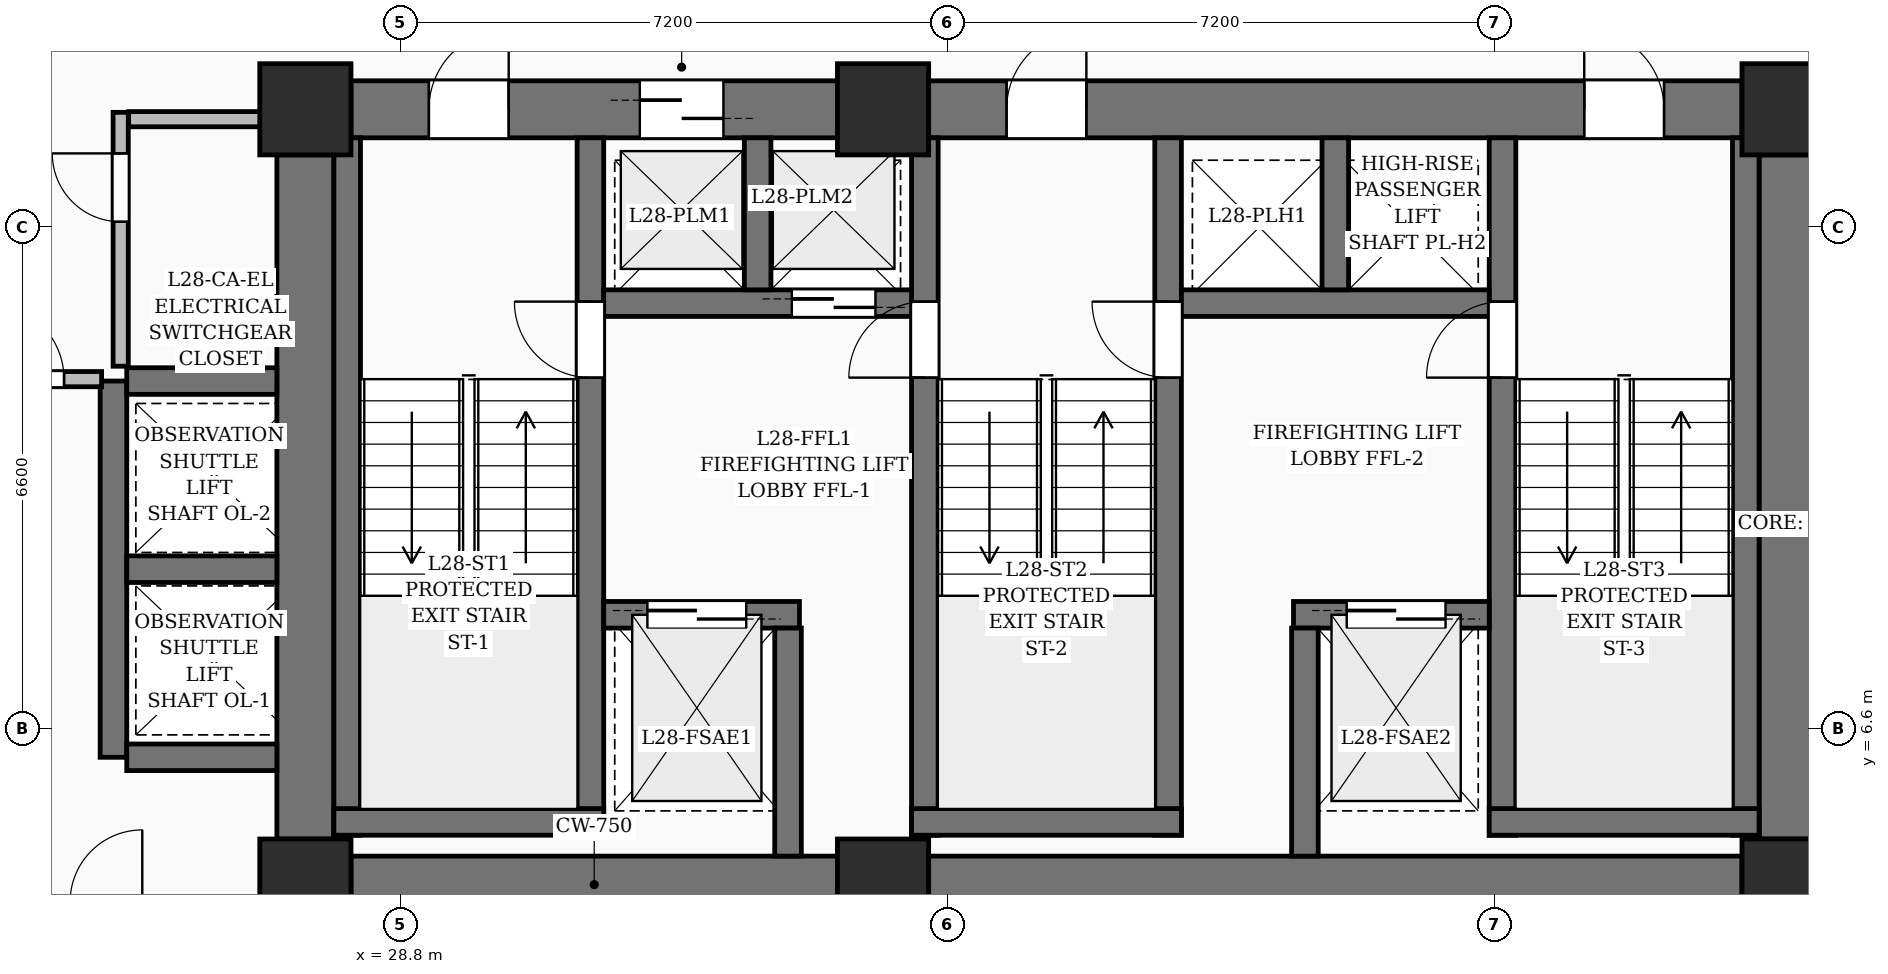
"""IFC4 building model, lengths in metres.
Left out: names, types, materials, properties, quantities, classifications, styles, units other than length and angle.
Written with IfcOpenShell. Run it as: python <this file> out.ifc"""

import sys

from ifc_helpers import new_model, si_unit, direction, frame, frame_2d, origin, origin_2d, place, context, subcontext, project, spatial, rectangle, extrude, element, fill, save


model = new_model("IFC4")
c1 = context("Model", 3, precision=1e-05, world=origin(), true_north=direction((0.0, 1.0)))
c2 = subcontext(c1, "Body", "Model", "MODEL_VIEW")
j1 = project(units=[si_unit("LENGTHUNIT", "METRE"), si_unit("PLANEANGLEUNIT", "RADIAN")], contexts=[c1])
p1 = place(None, origin())
s1 = spatial("IfcSite", under=j1, at=p1, CompositionType="ELEMENT")
p2 = place(p1, origin())
s2 = spatial("IfcBuilding", under=s1, at=p2, CompositionType="ELEMENT")
p3 = place(p2, frame((0.0, 0.0, 114.0)))
s3 = spatial("IfcBuildingStorey", under=s2, at=p3, CompositionType="ELEMENT", Elevation=114.0)
for number, where, z_axis, x_axis in (
    (1, (27.55, 4.55, 0.0), (0.0, 0.0, 1.0), (1.0, 0.0, 0.0)),
    (2, (35.15, 4.55, 0.0), (0.0, 0.0, 1.0), (1.0, 0.0, 0.0)),
    (3, (47.05, 4.55, 0.0), (0.0, 0.0, 1.0), (1.0, 0.0, 0.0)),
    (4, (27.55, 14.75, 0.0), (0.0, 0.0, 1.0), (1.0, 0.0, 0.0)),
    (5, (35.15, 14.75, 0.0), (0.0, 0.0, 1.0), (1.0, 0.0, 0.0)),
    (6, (47.05, 14.75, 0.0), (0.0, 0.0, 1.0), (1.0, 0.0, 0.0)),
):
    element("IfcColumn", number, at=place(p3, frame(where, z_axis=z_axis, x_axis=x_axis)), inside=s3, PredefinedType="COLUMN", context=c2, shape_type="SweptSolid", body=[
        extrude(rectangle(XDim=1.2, YDim=1.2, at=origin_2d()), origin(), (0.0, 0.0, 1.0), 3.6),
    ])
p4 = place(p3, frame((28.15, 4.55, 0.0), z_axis=(0.0, 0.0, 1.0), x_axis=(1.0, 0.0, 0.0)))
e7 = element("IfcWall", 7, at=p4, inside=s3, PredefinedType="SHEAR", context=c2, shape_type="SweptSolid", body=[
    extrude(rectangle(XDim=6.4, YDim=0.75, at=frame_2d((3.2, 0.0))), origin(), (0.0, 0.0, 1.0), 3.6),
])
p5 = place(p3, frame((35.75, 4.55, 0.0), z_axis=(0.0, 0.0, 1.0), x_axis=(1.0, 0.0, 0.0)))
e8 = element("IfcWall", 8, at=p5, inside=s3, PredefinedType="SHEAR", context=c2, shape_type="SweptSolid", body=[
    extrude(rectangle(XDim=10.7, YDim=0.75, at=frame_2d((5.35, 0.0))), origin(), (0.0, 0.0, 1.0), 3.6),
])
p6 = place(p3, frame((28.15, 14.75, 0.0), z_axis=(0.0, 0.0, 1.0), x_axis=(1.0, 0.0, 0.0)))
e9 = element("IfcWall", 9, at=p6, inside=s3, PredefinedType="SHEAR", context=c2, shape_type="SweptSolid", body=[
    extrude(rectangle(XDim=6.4, YDim=0.75, at=frame_2d((3.2, 0.0))), origin(), (0.0, 0.0, 1.0), 3.6),
])
p7 = place(p6, frame((1.025, 0.0, 0.0)))
e10 = element("IfcOpeningElement", 10, at=p7, cuts=e9, PredefinedType="OPENING", context=c2, shape_type="SweptSolid", body=[
    extrude(rectangle(XDim=1.05, YDim=2.15, at=frame_2d((0.525, 1.075))), frame((0.0, 0.385, 0.0), z_axis=(0.0, -1.0, 0.0), x_axis=(1.0, 0.0, 0.0)), (0.0, 0.0, 1.0), 0.77),
])
p8 = place(p6, frame((3.8, 0.0, 0.0)))
e11 = element("IfcOpeningElement", 11, at=p8, cuts=e9, PredefinedType="OPENING", context=c2, shape_type="SweptSolid", body=[
    extrude(rectangle(XDim=1.1, YDim=2.2, at=frame_2d((0.55, 1.1))), frame((0.0, 0.385, 0.0), z_axis=(0.0, -1.0, 0.0), x_axis=(1.0, 0.0, 0.0)), (0.0, 0.0, 1.0), 0.77),
])
p9 = place(p3, frame((35.75, 14.75, 0.0), z_axis=(0.0, 0.0, 1.0), x_axis=(1.0, 0.0, 0.0)))
e12 = element("IfcWall", 12, at=p9, inside=s3, PredefinedType="SHEAR", context=c2, shape_type="SweptSolid", body=[
    extrude(rectangle(XDim=10.7, YDim=0.75, at=frame_2d((5.35, 0.0))), origin(), (0.0, 0.0, 1.0), 3.6),
])
p10 = place(p9, frame((1.025, 0.0, 0.0)))
e13 = element("IfcOpeningElement", 13, at=p10, cuts=e12, PredefinedType="OPENING", context=c2, shape_type="SweptSolid", body=[
    extrude(rectangle(XDim=1.05, YDim=2.15, at=frame_2d((0.525, 1.075))), frame((0.0, 0.385, 0.0), z_axis=(0.0, -1.0, 0.0), x_axis=(1.0, 0.0, 0.0)), (0.0, 0.0, 1.0), 0.77),
])
p11 = place(p9, frame((8.625, 0.0, 0.0)))
e14 = element("IfcOpeningElement", 14, at=p11, cuts=e12, PredefinedType="OPENING", context=c2, shape_type="SweptSolid", body=[
    extrude(rectangle(XDim=1.05, YDim=2.15, at=frame_2d((0.525, 1.075))), frame((0.0, 0.385, 0.0), z_axis=(0.0, -1.0, 0.0), x_axis=(1.0, 0.0, 0.0)), (0.0, 0.0, 1.0), 0.77),
])
for number, where, z_axis, x_axis in (
    (15, (27.55, 5.15, 0.0), (0.0, 0.0, 1.0), (0.0, 1.0, 0.0)),
    (16, (47.05, 5.15, 0.0), (0.0, 0.0, 1.0), (0.0, 1.0, 0.0)),
):
    element("IfcWall", number, at=place(p3, frame(where, z_axis=z_axis, x_axis=x_axis)), inside=s3, PredefinedType="SHEAR", context=c2, shape_type="SweptSolid", body=[
        extrude(rectangle(XDim=9.0, YDim=0.75, at=frame_2d((4.5, 0.0))), origin(), (0.0, 0.0, 1.0), 3.6),
    ])
p12 = place(p3, frame((28.1, 5.2, 0.0), z_axis=(0.0, 0.0, 1.0), x_axis=(0.0, 1.0, 0.0)))
e17 = element("IfcWall", 17, at=p12, inside=s3, PredefinedType="SOLIDWALL", context=c2, shape_type="SweptSolid", body=[
    extrude(rectangle(XDim=9.175, YDim=0.35, at=frame_2d((4.587, 0.0))), origin(), (0.0, 0.0, 1.0), 3.6),
])
p13 = place(p3, frame((31.3, 5.2, 0.0), z_axis=(0.0, 0.0, 1.0), x_axis=(0.0, 1.0, 0.0)))
e18 = element("IfcWall", 18, at=p13, inside=s3, PredefinedType="SOLIDWALL", context=c2, shape_type="SweptSolid", body=[
    extrude(rectangle(XDim=9.175, YDim=0.35, at=frame_2d((4.587, 0.0))), origin(), (0.0, 0.0, 1.0), 3.6),
])
p14 = place(p13, frame((6.02, 0.0, 0.0)))
e19 = element("IfcOpeningElement", 19, at=p14, cuts=e18, PredefinedType="OPENING", context=c2, shape_type="SweptSolid", body=[
    extrude(rectangle(XDim=1.0, YDim=2.15, at=frame_2d((0.5, 1.075))), frame((0.0, 0.185, 0.0), z_axis=(0.0, -1.0, 0.0), x_axis=(1.0, 0.0, 0.0)), (0.0, 0.0, 1.0), 0.37),
])
p15 = place(p3, frame((27.925, 5.375, 0.0), z_axis=(0.0, 0.0, 1.0), x_axis=(1.0, 0.0, 0.0)))
e20 = element("IfcWall", 20, at=p15, inside=s3, PredefinedType="SOLIDWALL", context=c2, shape_type="SweptSolid", body=[
    extrude(rectangle(XDim=3.55, YDim=0.35, at=frame_2d((1.775, 0.0))), origin(), (0.0, 0.0, 1.0), 3.6),
])
p16 = place(p3, frame((35.7, 5.2, 0.0), z_axis=(0.0, 0.0, 1.0), x_axis=(0.0, 1.0, 0.0)))
e21 = element("IfcWall", 21, at=p16, inside=s3, PredefinedType="SOLIDWALL", context=c2, shape_type="SweptSolid", body=[
    extrude(rectangle(XDim=9.175, YDim=0.35, at=frame_2d((4.587, 0.0))), origin(), (0.0, 0.0, 1.0), 3.6),
])
p17 = place(p16, frame((6.02, 0.0, 0.0)))
e22 = element("IfcOpeningElement", 22, at=p17, cuts=e21, PredefinedType="OPENING", context=c2, shape_type="SweptSolid", body=[
    extrude(rectangle(XDim=1.0, YDim=2.15, at=frame_2d((0.5, 1.075))), frame((0.0, 0.185, 0.0), z_axis=(0.0, -1.0, 0.0), x_axis=(1.0, 0.0, 0.0)), (0.0, 0.0, 1.0), 0.37),
])
p18 = place(p3, frame((38.9, 5.2, 0.0), z_axis=(0.0, 0.0, 1.0), x_axis=(0.0, 1.0, 0.0)))
e23 = element("IfcWall", 23, at=p18, inside=s3, PredefinedType="SOLIDWALL", context=c2, shape_type="SweptSolid", body=[
    extrude(rectangle(XDim=9.175, YDim=0.35, at=frame_2d((4.587, 0.0))), origin(), (0.0, 0.0, 1.0), 3.6),
])
p19 = place(p18, frame((6.02, 0.0, 0.0)))
e24 = element("IfcOpeningElement", 24, at=p19, cuts=e23, PredefinedType="OPENING", context=c2, shape_type="SweptSolid", body=[
    extrude(rectangle(XDim=1.0, YDim=2.15, at=frame_2d((0.5, 1.075))), frame((0.0, 0.185, 0.0), z_axis=(0.0, -1.0, 0.0), x_axis=(1.0, 0.0, 0.0)), (0.0, 0.0, 1.0), 0.37),
])
p20 = place(p3, frame((35.525, 5.375, 0.0), z_axis=(0.0, 0.0, 1.0), x_axis=(1.0, 0.0, 0.0)))
e25 = element("IfcWall", 25, at=p20, inside=s3, PredefinedType="SOLIDWALL", context=c2, shape_type="SweptSolid", body=[
    extrude(rectangle(XDim=3.55, YDim=0.35, at=frame_2d((1.775, 0.0))), origin(), (0.0, 0.0, 1.0), 3.6),
])
p21 = place(p3, frame((43.3, 5.2, 0.0), z_axis=(0.0, 0.0, 1.0), x_axis=(0.0, 1.0, 0.0)))
e26 = element("IfcWall", 26, at=p21, inside=s3, PredefinedType="SOLIDWALL", context=c2, shape_type="SweptSolid", body=[
    extrude(rectangle(XDim=9.175, YDim=0.35, at=frame_2d((4.587, 0.0))), origin(), (0.0, 0.0, 1.0), 3.6),
])
p22 = place(p21, frame((6.02, 0.0, 0.0)))
e27 = element("IfcOpeningElement", 27, at=p22, cuts=e26, PredefinedType="OPENING", context=c2, shape_type="SweptSolid", body=[
    extrude(rectangle(XDim=1.0, YDim=2.15, at=frame_2d((0.5, 1.075))), frame((0.0, 0.185, 0.0), z_axis=(0.0, -1.0, 0.0), x_axis=(1.0, 0.0, 0.0)), (0.0, 0.0, 1.0), 0.37),
])
p23 = place(p3, frame((46.5, 5.2, 0.0), z_axis=(0.0, 0.0, 1.0), x_axis=(0.0, 1.0, 0.0)))
e28 = element("IfcWall", 28, at=p23, inside=s3, PredefinedType="SOLIDWALL", context=c2, shape_type="SweptSolid", body=[
    extrude(rectangle(XDim=9.175, YDim=0.35, at=frame_2d((4.587, 0.0))), origin(), (0.0, 0.0, 1.0), 3.6),
])
p24 = place(p3, frame((43.125, 5.375, 0.0), z_axis=(0.0, 0.0, 1.0), x_axis=(1.0, 0.0, 0.0)))
e29 = element("IfcWall", 29, at=p24, inside=s3, PredefinedType="SOLIDWALL", context=c2, shape_type="SweptSolid", body=[
    extrude(rectangle(XDim=3.55, YDim=0.35, at=frame_2d((1.775, 0.0))), origin(), (0.0, 0.0, 1.0), 3.6),
])
p25 = place(p3, frame((31.475, 8.1, 0.0), z_axis=(0.0, 0.0, 1.0), x_axis=(1.0, 0.0, 0.0)))
e30 = element("IfcWall", 30, at=p25, inside=s3, PredefinedType="SOLIDWALL", context=c2, shape_type="SweptSolid", body=[
    extrude(rectangle(XDim=2.575, YDim=0.35, at=frame_2d((1.288, 0.0))), origin(), (0.0, 0.0, 1.0), 3.6),
])
p26 = place(p25, frame((0.575, 0.0, 0.0)))
e31 = element("IfcOpeningElement", 31, at=p26, cuts=e30, PredefinedType="OPENING", context=c2, shape_type="SweptSolid", body=[
    extrude(rectangle(XDim=1.3, YDim=2.25, at=frame_2d((0.65, 1.125))), frame((0.0, 0.185, 0.0), z_axis=(0.0, -1.0, 0.0), x_axis=(1.0, 0.0, 0.0)), (0.0, 0.0, 1.0), 0.37),
])
p27 = place(p3, frame((40.55, 8.1, 0.0), z_axis=(0.0, 0.0, 1.0), x_axis=(1.0, 0.0, 0.0)))
e32 = element("IfcWall", 32, at=p27, inside=s3, PredefinedType="SOLIDWALL", context=c2, shape_type="SweptSolid", body=[
    extrude(rectangle(XDim=2.575, YDim=0.35, at=frame_2d((1.288, 0.0))), origin(), (0.0, 0.0, 1.0), 3.6),
])
p28 = place(p27, frame((0.7, 0.0, 0.0)))
e33 = element("IfcOpeningElement", 33, at=p28, cuts=e32, PredefinedType="OPENING", context=c2, shape_type="SweptSolid", body=[
    extrude(rectangle(XDim=1.3, YDim=2.25, at=frame_2d((0.65, 1.125))), frame((0.0, 0.185, 0.0), z_axis=(0.0, -1.0, 0.0), x_axis=(1.0, 0.0, 0.0)), (0.0, 0.0, 1.0), 0.37),
])
for number, where, z_axis, x_axis in (
    (34, (33.9, 4.925, 0.0), (0.0, 0.0, 1.0), (0.0, 1.0, 0.0)),
    (35, (40.7, 4.925, 0.0), (0.0, 0.0, 1.0), (0.0, 1.0, 0.0)),
):
    element("IfcWall", number, at=place(p3, frame(where, z_axis=z_axis, x_axis=x_axis)), inside=s3, PredefinedType="SOLIDWALL", context=c2, shape_type="SweptSolid", body=[
        extrude(rectangle(XDim=3.0, YDim=0.35, at=frame_2d((1.5, 0.0))), origin(), (0.0, 0.0, 1.0), 3.6),
    ])
p29 = place(p3, frame((31.475, 12.2, 0.0), z_axis=(0.0, 0.0, 1.0), x_axis=(1.0, 0.0, 0.0)))
e36 = element("IfcWall", 36, at=p29, inside=s3, PredefinedType="SOLIDWALL", context=c2, shape_type="SweptSolid", body=[
    extrude(rectangle(XDim=4.05, YDim=0.35, at=frame_2d((2.025, 0.0))), origin(), (0.0, 0.0, 1.0), 3.6),
])
p30 = place(p29, frame((2.475, 0.0, 0.0)))
e37 = element("IfcOpeningElement", 37, at=p30, cuts=e36, PredefinedType="OPENING", context=c2, shape_type="SweptSolid", body=[
    extrude(rectangle(XDim=1.1, YDim=2.2, at=frame_2d((0.55, 1.1))), frame((0.0, 0.185, 0.0), z_axis=(0.0, -1.0, 0.0), x_axis=(1.0, 0.0, 0.0)), (0.0, 0.0, 1.0), 0.37),
])
p31 = place(p3, frame((33.5, 12.375, 0.0), z_axis=(0.0, 0.0, 1.0), x_axis=(0.0, 1.0, 0.0)))
e38 = element("IfcWall", 38, at=p31, inside=s3, PredefinedType="SOLIDWALL", context=c2, shape_type="SweptSolid", body=[
    extrude(rectangle(XDim=2.0, YDim=0.35, at=frame_2d((1.0, 0.0))), origin(), (0.0, 0.0, 1.0), 3.6),
])
p32 = place(p3, frame((39.075, 12.2, 0.0), z_axis=(0.0, 0.0, 1.0), x_axis=(1.0, 0.0, 0.0)))
e39 = element("IfcWall", 39, at=p32, inside=s3, PredefinedType="SOLIDWALL", context=c2, shape_type="SweptSolid", body=[
    extrude(rectangle(XDim=4.05, YDim=0.35, at=frame_2d((2.025, 0.0))), origin(), (0.0, 0.0, 1.0), 3.6),
])
p33 = place(p3, frame((41.1, 12.375, 0.0), z_axis=(0.0, 0.0, 1.0), x_axis=(0.0, 1.0, 0.0)))
e40 = element("IfcWall", 40, at=p33, inside=s3, PredefinedType="SOLIDWALL", context=c2, shape_type="SweptSolid", body=[
    extrude(rectangle(XDim=2.0, YDim=0.35, at=frame_2d((1.0, 0.0))), origin(), (0.0, 0.0, 1.0), 3.6),
])
p34 = place(p3, frame((25.025, 6.225, 0.0), z_axis=(0.0, 0.0, 1.0), x_axis=(0.0, 1.0, 0.0)))
e41 = element("IfcWall", 41, at=p34, inside=s3, PredefinedType="SOLIDWALL", context=c2, shape_type="SweptSolid", body=[
    extrude(rectangle(XDim=4.95, YDim=0.35, at=frame_2d((2.475, 0.0))), origin(), (0.0, 0.0, 1.0), 3.6),
])
for number, where, z_axis, x_axis in (
    (42, (25.2, 6.225, 0.0), (0.0, 0.0, 1.0), (1.0, 0.0, 0.0)),
    (43, (25.2, 8.7, 0.0), (0.0, 0.0, 1.0), (1.0, 0.0, 0.0)),
    (44, (25.2, 11.175, 0.0), (0.0, 0.0, 1.0), (1.0, 0.0, 0.0)),
):
    element("IfcWall", number, at=place(p3, frame(where, z_axis=z_axis, x_axis=x_axis)), inside=s3, PredefinedType="SOLIDWALL", context=c2, shape_type="SweptSolid", body=[
        extrude(rectangle(XDim=1.975, YDim=0.35, at=frame_2d((0.988, 0.0))), origin(), (0.0, 0.0, 1.0), 3.6),
    ])
p35 = place(p3, frame((25.12, 11.37, 0.0), z_axis=(0.0, 0.0, 1.0), x_axis=(0.0, 1.0, 0.0)))
e45 = element("IfcWall", 45, at=p35, inside=s3, PredefinedType="PARTITIONING", context=c2, shape_type="SweptSolid", body=[
    extrude(rectangle(XDim=3.34, YDim=0.2, at=frame_2d((1.67, 0.0))), origin(), (0.0, 0.0, 1.0), 3.35),
])
p36 = place(p35, frame((1.9, 0.0, 0.0)))
e46 = element("IfcOpeningElement", 46, at=p36, cuts=e45, PredefinedType="OPENING", context=c2, shape_type="SweptSolid", body=[
    extrude(rectangle(XDim=0.9, YDim=2.1, at=frame_2d((0.45, 1.05))), frame((0.0, 0.11, 0.0), z_axis=(0.0, -1.0, 0.0), x_axis=(1.0, 0.0, 0.0)), (0.0, 0.0, 1.0), 0.22),
])
p37 = place(p3, frame((25.225, 14.62, 0.0), z_axis=(0.0, 0.0, 1.0), x_axis=(1.0, 0.0, 0.0)))
e47 = element("IfcWall", 47, at=p37, inside=s3, PredefinedType="PARTITIONING", context=c2, shape_type="SweptSolid", body=[
    extrude(rectangle(XDim=1.935, YDim=0.2, at=frame_2d((0.967, 0.0))), origin(), (0.0, 0.0, 1.0), 3.35),
])
p38 = place(p3, frame((22.8, 11.2, 0.0), z_axis=(0.0, 0.0, 1.0), x_axis=(1.0, 0.0, 0.0)))
e48 = element("IfcWall", 48, at=p38, inside=s3, PredefinedType="PARTITIONING", context=c2, shape_type="SweptSolid", body=[
    extrude(rectangle(XDim=2.069, YDim=0.2, at=frame_2d((1.035, 0.0))), origin(), (0.0, 0.0, 1.0), 3.35),
])
p39 = place(p38, frame((0.575, 0.0, 0.0)))
e49 = element("IfcOpeningElement", 49, at=p39, cuts=e48, PredefinedType="OPENING", context=c2, shape_type="SweptSolid", body=[
    extrude(rectangle(XDim=1.0, YDim=2.2, at=frame_2d((0.5, 1.1))), frame((0.0, 0.11, 0.0), z_axis=(0.0, -1.0, 0.0), x_axis=(1.0, 0.0, 0.0)), (0.0, 0.0, 1.0), 0.22),
])
p40 = place(p7, origin())
e50 = element("IfcDoor", 50, at=p40, inside=s3, OperationType="SINGLE_SWING_RIGHT", PredefinedType="DOOR", context=c2, shape_type="SweptSolid", body=[
    extrude(rectangle(XDim=1.05, YDim=2.15, at=frame_2d((0.525, 1.075))), frame((0.0, 0.025, 0.0), z_axis=(0.0, -1.0, 0.0), x_axis=(1.0, 0.0, 0.0)), (0.0, 0.0, 1.0), 0.05),
])
fill(e10, e50)
p41 = place(p10, origin())
e51 = element("IfcDoor", 51, at=p41, inside=s3, OperationType="SINGLE_SWING_RIGHT", PredefinedType="DOOR", context=c2, shape_type="SweptSolid", body=[
    extrude(rectangle(XDim=1.05, YDim=2.15, at=frame_2d((0.525, 1.075))), frame((0.0, 0.025, 0.0), z_axis=(0.0, -1.0, 0.0), x_axis=(1.0, 0.0, 0.0)), (0.0, 0.0, 1.0), 0.05),
])
fill(e13, e51)
p42 = place(p11, origin())
e52 = element("IfcDoor", 52, at=p42, inside=s3, OperationType="SINGLE_SWING_LEFT", PredefinedType="DOOR", context=c2, shape_type="SweptSolid", body=[
    extrude(rectangle(XDim=1.05, YDim=2.15, at=frame_2d((0.525, 1.075))), frame((0.0, 0.025, 0.0), z_axis=(0.0, -1.0, 0.0), x_axis=(1.0, 0.0, 0.0)), (0.0, 0.0, 1.0), 0.05),
])
fill(e14, e52)
p43 = place(p14, origin())
e53 = element("IfcDoor", 53, at=p43, inside=s3, OperationType="SINGLE_SWING_RIGHT", PredefinedType="DOOR", context=c2, shape_type="SweptSolid", body=[
    extrude(rectangle(XDim=1.0, YDim=2.15, at=frame_2d((0.5, 1.075))), frame((0.0, 0.025, 0.0), z_axis=(0.0, -1.0, 0.0), x_axis=(1.0, 0.0, 0.0)), (0.0, 0.0, 1.0), 0.05),
])
fill(e19, e53)
p44 = place(p17, origin())
e54 = element("IfcDoor", 54, at=p44, inside=s3, OperationType="SINGLE_SWING_LEFT", PredefinedType="DOOR", context=c2, shape_type="SweptSolid", body=[
    extrude(rectangle(XDim=1.0, YDim=2.15, at=frame_2d((0.5, 1.075))), frame((0.0, 0.025, 0.0), z_axis=(0.0, -1.0, 0.0), x_axis=(1.0, 0.0, 0.0)), (0.0, 0.0, 1.0), 0.05),
])
fill(e22, e54)
p45 = place(p19, origin())
e55 = element("IfcDoor", 55, at=p45, inside=s3, OperationType="SINGLE_SWING_RIGHT", PredefinedType="DOOR", context=c2, shape_type="SweptSolid", body=[
    extrude(rectangle(XDim=1.0, YDim=2.15, at=frame_2d((0.5, 1.075))), frame((0.0, 0.025, 0.0), z_axis=(0.0, -1.0, 0.0), x_axis=(1.0, 0.0, 0.0)), (0.0, 0.0, 1.0), 0.05),
])
fill(e24, e55)
p46 = place(p22, origin())
e56 = element("IfcDoor", 56, at=p46, inside=s3, OperationType="SINGLE_SWING_LEFT", PredefinedType="DOOR", context=c2, shape_type="SweptSolid", body=[
    extrude(rectangle(XDim=1.0, YDim=2.15, at=frame_2d((0.5, 1.075))), frame((0.0, 0.025, 0.0), z_axis=(0.0, -1.0, 0.0), x_axis=(1.0, 0.0, 0.0)), (0.0, 0.0, 1.0), 0.05),
])
fill(e27, e56)
p47 = place(p26, origin())
e57 = element("IfcDoor", 57, at=p47, inside=s3, OperationType="DOUBLE_DOOR_SLIDING", PredefinedType="DOOR", context=c2, shape_type="SweptSolid", body=[
    extrude(rectangle(XDim=1.3, YDim=2.25, at=frame_2d((0.65, 1.125))), frame((0.0, 0.025, 0.0), z_axis=(0.0, -1.0, 0.0), x_axis=(1.0, 0.0, 0.0)), (0.0, 0.0, 1.0), 0.05),
])
fill(e31, e57)
p48 = place(p28, origin())
e58 = element("IfcDoor", 58, at=p48, inside=s3, OperationType="DOUBLE_DOOR_SLIDING", PredefinedType="DOOR", context=c2, shape_type="SweptSolid", body=[
    extrude(rectangle(XDim=1.3, YDim=2.25, at=frame_2d((0.65, 1.125))), frame((0.0, 0.025, 0.0), z_axis=(0.0, -1.0, 0.0), x_axis=(1.0, 0.0, 0.0)), (0.0, 0.0, 1.0), 0.05),
])
fill(e33, e58)
p49 = place(p8, origin())
e59 = element("IfcDoor", 59, at=p49, inside=s3, OperationType="DOUBLE_DOOR_SLIDING", PredefinedType="DOOR", context=c2, shape_type="SweptSolid", body=[
    extrude(rectangle(XDim=1.1, YDim=2.2, at=frame_2d((0.55, 1.1))), frame((0.0, 0.025, 0.0), z_axis=(0.0, -1.0, 0.0), x_axis=(1.0, 0.0, 0.0)), (0.0, 0.0, 1.0), 0.05),
])
fill(e11, e59)
p50 = place(p30, origin())
e60 = element("IfcDoor", 60, at=p50, inside=s3, OperationType="DOUBLE_DOOR_SLIDING", PredefinedType="DOOR", context=c2, shape_type="SweptSolid", body=[
    extrude(rectangle(XDim=1.1, YDim=2.2, at=frame_2d((0.55, 1.1))), frame((0.0, 0.025, 0.0), z_axis=(0.0, -1.0, 0.0), x_axis=(1.0, 0.0, 0.0)), (0.0, 0.0, 1.0), 0.05),
])
fill(e37, e60)
p51 = place(p36, origin())
e61 = element("IfcDoor", 61, at=p51, inside=s3, OperationType="SINGLE_SWING_RIGHT", PredefinedType="DOOR", context=c2, shape_type="SweptSolid", body=[
    extrude(rectangle(XDim=0.9, YDim=2.1, at=frame_2d((0.45, 1.05))), frame((0.0, 0.025, 0.0), z_axis=(0.0, -1.0, 0.0), x_axis=(1.0, 0.0, 0.0)), (0.0, 0.0, 1.0), 0.05),
])
fill(e46, e61)
p52 = place(p39, origin())
e62 = element("IfcDoor", 62, at=p52, inside=s3, OperationType="SINGLE_SWING_LEFT", PredefinedType="DOOR", context=c2, shape_type="SweptSolid", body=[
    extrude(rectangle(XDim=1.0, YDim=2.2, at=frame_2d((0.5, 1.1))), frame((0.0, 0.025, 0.0), z_axis=(0.0, -1.0, 0.0), x_axis=(1.0, 0.0, 0.0)), (0.0, 0.0, 1.0), 0.05),
])
fill(e49, e62)
save(model, sys.argv[1])
